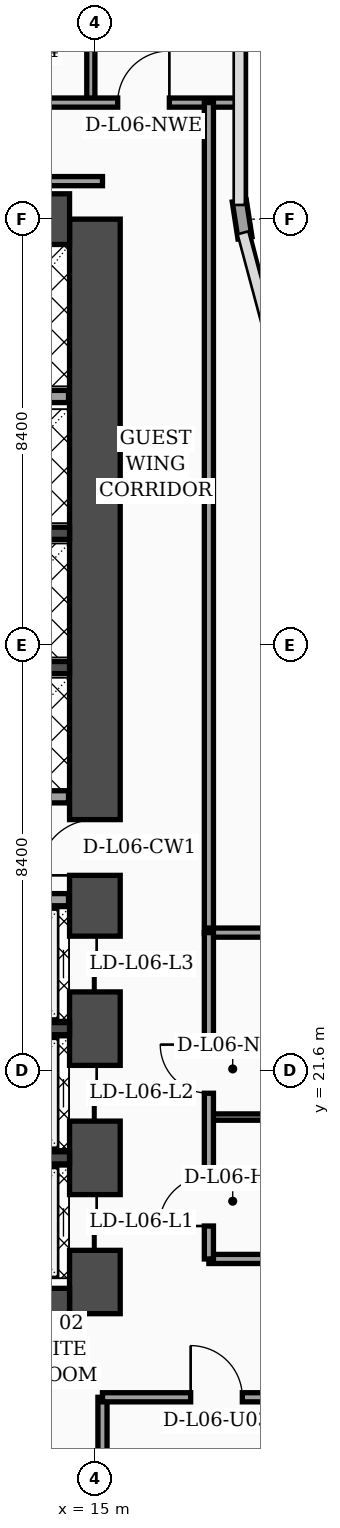
"""IFC4 building model, lengths in metres.
Left out: names, types, materials, properties, quantities, classifications, styles, units other than length and angle.
Written with IfcOpenShell. Run it as: python <this file> out.ifc"""

import sys

from ifc_helpers import new_model, si_unit, direction, frame, frame_2d, origin, place, context, subcontext, project, spatial, rectangle, extrude, element, fill, save


model = new_model("IFC4")
c1 = context("Model", 3, precision=1e-05, world=origin(), true_north=direction((0.0, 1.0)))
c2 = subcontext(c1, "Body", "Model", "MODEL_VIEW")
j1 = project(units=[si_unit("LENGTHUNIT", "METRE"), si_unit("PLANEANGLEUNIT", "RADIAN")], contexts=[c1])
p1 = place(None, origin())
s1 = spatial("IfcSite", under=j1, at=p1, CompositionType="ELEMENT")
p2 = place(p1, origin())
s2 = spatial("IfcBuilding", under=s1, at=p2, CompositionType="ELEMENT")
p3 = place(p2, frame((0.0, 0.0, 30.8)))
s3 = spatial("IfcBuildingStorey", under=s2, at=p3, CompositionType="ELEMENT", Elevation=30.8)
p4 = place(p3, frame((15.0, 16.8, 0.0), z_axis=(0.0, 0.0, 1.0), x_axis=(0.0, 1.0, 0.0)))
e1 = element("IfcWall", 1, at=p4, inside=s3, PredefinedType="SHEAR", context=c2, shape_type="SweptSolid", body=[
    extrude(rectangle(XDim=21.6, YDim=1.0, at=frame_2d((10.8, 0.0))), origin(), (0.0, 0.0, 1.0), 3.56),
])
p5 = place(p4, frame((8.65, 0.0, 0.0)))
e2 = element("IfcOpeningElement", 2, at=p5, cuts=e1, PredefinedType="OPENING", context=c2, shape_type="SweptSolid", body=[
    extrude(rectangle(XDim=1.1, YDim=2.2, at=frame_2d((0.55, 1.1))), frame((0.0, 0.51, 0.0), z_axis=(0.0, -1.0, 0.0), x_axis=(1.0, 0.0, 0.0)), (0.0, 0.0, 1.0), 1.02),
])
p6 = place(p4, frame((1.25, 0.0, 0.0)))
e3 = element("IfcOpeningElement", 3, at=p6, cuts=e1, PredefinedType="OPENING", context=c2, shape_type="SweptSolid", body=[
    extrude(rectangle(XDim=1.1, YDim=2.2, at=frame_2d((0.55, 1.1))), frame((0.0, 0.51, 0.0), z_axis=(0.0, -1.0, 0.0), x_axis=(1.0, 0.0, 0.0)), (0.0, 0.0, 1.0), 1.02),
])
p7 = place(p4, frame((3.8, 0.0, 0.0)))
e4 = element("IfcOpeningElement", 4, at=p7, cuts=e1, PredefinedType="OPENING", context=c2, shape_type="SweptSolid", body=[
    extrude(rectangle(XDim=1.1, YDim=2.2, at=frame_2d((0.55, 1.1))), frame((0.0, 0.51, 0.0), z_axis=(0.0, -1.0, 0.0), x_axis=(1.0, 0.0, 0.0)), (0.0, 0.0, 1.0), 1.02),
])
p8 = place(p4, frame((6.35, 0.0, 0.0)))
e5 = element("IfcOpeningElement", 5, at=p8, cuts=e1, PredefinedType="OPENING", context=c2, shape_type="SweptSolid", body=[
    extrude(rectangle(XDim=1.1, YDim=2.2, at=frame_2d((0.55, 1.1))), frame((0.0, 0.51, 0.0), z_axis=(0.0, -1.0, 0.0), x_axis=(1.0, 0.0, 0.0)), (0.0, 0.0, 1.0), 1.02),
])
for number, where, z_axis, x_axis in (
    (6, (4.7, 38.4, 0.0), (0.0, 0.0, 1.0), (1.0, 0.0, 0.0)),
    (7, (4.7, 16.8, 0.0), (0.0, 0.0, 1.0), (1.0, 0.0, 0.0)),
):
    element("IfcWall", number, at=place(p3, frame(where, z_axis=z_axis, x_axis=x_axis)), inside=s3, PredefinedType="SHEAR", context=c2, shape_type="SweptSolid", body=[
        extrude(rectangle(XDim=9.8, YDim=1.0, at=frame_2d((4.9, 0.0))), origin(), (0.0, 0.0, 1.0), 3.56),
    ])
for number, where, z_axis, x_axis in (
    (8, (12.18, 19.875, 0.0), (0.0, 0.0, 1.0), (1.0, 0.0, 0.0)),
    (9, (12.18, 22.425, 0.0), (0.0, 0.0, 1.0), (1.0, 0.0, 0.0)),
    (10, (12.18, 29.55, 0.0), (0.0, 0.0, 1.0), (1.0, 0.0, 0.0)),
    (11, (12.18, 32.2, 0.0), (0.0, 0.0, 1.0), (1.0, 0.0, 0.0)),
):
    element("IfcWall", number, at=place(p3, frame(where, z_axis=z_axis, x_axis=x_axis)), inside=s3, PredefinedType="SOLIDWALL", context=c2, shape_type="SweptSolid", body=[
        extrude(rectangle(XDim=2.32, YDim=0.24, at=frame_2d((1.16, 0.0))), origin(), (0.0, 0.0, 1.0), 3.56),
    ])
p9 = place(p3, frame((17.962, 38.03, 0.0), z_axis=(0.0, 0.0, 1.0), x_axis=(-0.15141125477, 0.988470855377, 0.0)))
e12 = element("IfcWall", 12, at=p9, inside=s3, PredefinedType="SOLIDWALL", context=c2, shape_type="SweptSolid", body=[
    extrude(rectangle(XDim=0.739, YDim=0.28, at=frame_2d((0.369, 0.0))), origin(), (0.0, 0.0, 1.0), 3.56),
])
p10 = place(p3, frame((12.15, 24.97, 0.0), z_axis=(0.0, 0.0, 1.0), x_axis=(1.0, 0.0, 0.0)))
e13 = element("IfcWall", 13, at=p10, inside=s3, PredefinedType="SOLIDWALL", context=c2, shape_type="SweptSolid", body=[
    extrude(rectangle(XDim=2.33, YDim=0.24, at=frame_2d((1.165, 0.0))), origin(), (0.0, 0.0, 1.0), 2.84),
])
p11 = place(p3, frame((12.25, 27.0, 0.0), z_axis=(0.0, 0.0, 1.0), x_axis=(1.0, 0.0, 0.0)))
e14 = element("IfcWall", 14, at=p11, inside=s3, PredefinedType="SOLIDWALL", context=c2, shape_type="SweptSolid", body=[
    extrude(rectangle(XDim=2.23, YDim=0.24, at=frame_2d((1.115, 0.0))), origin(), (0.0, 0.0, 1.0), 3.56),
])
p12 = place(p3, frame((9.66, 34.9, 0.0), z_axis=(0.0, 0.0, 1.0), x_axis=(1.0, 0.0, 0.0)))
e15 = element("IfcWall", 15, at=p12, inside=s3, PredefinedType="SOLIDWALL", context=c2, shape_type="SweptSolid", body=[
    extrude(rectangle(XDim=4.82, YDim=0.24, at=frame_2d((2.41, 0.0))), origin(), (0.0, 0.0, 1.0), 3.56),
])
p13 = place(p3, frame((15.15, 2.44, 0.0), z_axis=(0.0, 0.0, 1.0), x_axis=(0.0, 1.0, 0.0)))
e16 = element("IfcWall", 16, at=p13, inside=s3, PredefinedType="PARTITIONING", context=c2, shape_type="SweptSolid", body=[
    extrude(rectangle(XDim=12.71, YDim=0.18, at=frame_2d((6.355, 0.0))), origin(), (0.0, 0.0, 1.0), 3.04),
])
p14 = place(p3, frame((15.15, 15.15, 0.0), z_axis=(0.0, 0.0, 1.0), x_axis=(1.0, 0.0, 0.0)))
e17 = element("IfcWall", 17, at=p14, inside=s3, PredefinedType="PARTITIONING", context=c2, shape_type="SweptSolid", body=[
    extrude(rectangle(XDim=6.45, YDim=0.18, at=frame_2d((3.225, 0.0))), origin(), (0.0, 0.0, 1.0), 2.34),
])
p15 = place(p14, frame((1.74, 0.0, 0.0)))
e18 = element("IfcOpeningElement", 18, at=p15, cuts=e17, PredefinedType="OPENING", context=c2, shape_type="SweptSolid", body=[
    extrude(rectangle(XDim=1.02, YDim=2.2, at=frame_2d((0.51, 1.1))), frame((0.0, 0.1, 0.0), z_axis=(0.0, -1.0, 0.0), x_axis=(1.0, 0.0, 0.0)), (0.0, 0.0, 1.0), 0.2),
])
p16 = place(p3, frame((14.92, 40.7, 0.0), z_axis=(0.0, 0.0, 1.0), x_axis=(0.0, 1.0, 0.0)))
e19 = element("IfcWall", 19, at=p16, inside=s3, PredefinedType="PARTITIONING", context=c2, shape_type="SweptSolid", body=[
    extrude(rectangle(XDim=7.1, YDim=0.16, at=frame_2d((3.55, 0.0))), origin(), (0.0, 0.0, 1.0), 3.04),
])
p17 = place(p3, frame((0.08, 40.7, 0.0), z_axis=(0.0, 0.0, 1.0), x_axis=(1.0, 0.0, 0.0)))
e20 = element("IfcWall", 20, at=p17, inside=s3, PredefinedType="PARTITIONING", context=c2, shape_type="SweptSolid", body=[
    extrude(rectangle(XDim=17.77, YDim=0.18, at=frame_2d((8.885, 0.0))), origin(), (0.0, 0.0, 1.0), 2.84),
])
p18 = place(p17, frame((0.9, 0.0, 0.0)))
e21 = element("IfcOpeningElement", 21, at=p18, cuts=e20, PredefinedType="OPENING", context=c2, shape_type="SweptSolid", body=[
    extrude(rectangle(XDim=1.02, YDim=2.2, at=frame_2d((0.51, 1.1))), frame((0.0, 0.1, 0.0), z_axis=(0.0, -1.0, 0.0), x_axis=(1.0, 0.0, 0.0)), (0.0, 0.0, 1.0), 0.2),
])
p19 = place(p17, frame((7.38, 0.0, 0.0)))
e22 = element("IfcOpeningElement", 22, at=p19, cuts=e20, PredefinedType="OPENING", context=c2, shape_type="SweptSolid", body=[
    extrude(rectangle(XDim=1.02, YDim=2.2, at=frame_2d((0.51, 1.1))), frame((0.0, 0.1, 0.0), z_axis=(0.0, -1.0, 0.0), x_axis=(1.0, 0.0, 0.0)), (0.0, 0.0, 1.0), 0.2),
])
p20 = place(p17, frame((15.37, 0.0, 0.0)))
e23 = element("IfcOpeningElement", 23, at=p20, cuts=e20, PredefinedType="OPENING", context=c2, shape_type="SweptSolid", body=[
    extrude(rectangle(XDim=1.02, YDim=2.2, at=frame_2d((0.51, 1.1))), frame((0.0, 0.1, 0.0), z_axis=(0.0, -1.0, 0.0), x_axis=(1.0, 0.0, 0.0)), (0.0, 0.0, 1.0), 0.2),
])
p21 = place(p3, frame((17.25, 24.3, 0.0), z_axis=(0.0, 0.0, 1.0), x_axis=(0.0, 1.0, 0.0)))
e24 = element("IfcWall", 24, at=p21, inside=s3, PredefinedType="PARTITIONING", context=c2, shape_type="SweptSolid", body=[
    extrude(rectangle(XDim=16.4, YDim=0.18, at=frame_2d((8.2, 0.0))), origin(), (0.0, 0.0, 1.0), 2.84),
])
p22 = place(p3, frame((3.68, 39.15, 0.0), z_axis=(0.0, 0.0, 1.0), x_axis=(1.0, 0.0, 0.0)))
e25 = element("IfcWall", 25, at=p22, inside=s3, PredefinedType="PARTITIONING", context=c2, shape_type="SweptSolid", body=[
    extrude(rectangle(XDim=11.47, YDim=0.18, at=frame_2d((5.735, 0.0))), origin(), (0.0, 0.0, 1.0), 2.84),
])
p23 = place(p3, frame((17.25, 17.88, 0.0), z_axis=(0.0, 0.0, 1.0), x_axis=(1.0, 0.0, 0.0)))
e26 = element("IfcWall", 26, at=p23, inside=s3, PredefinedType="PARTITIONING", context=c2, shape_type="SweptSolid", body=[
    extrude(rectangle(XDim=4.3, YDim=0.18, at=frame_2d((2.15, 0.0))), origin(), (0.0, 0.0, 1.0), 3.09),
])
p24 = place(p3, frame((17.25, 20.68, 0.0), z_axis=(0.0, 0.0, 1.0), x_axis=(1.0, 0.0, 0.0)))
e27 = element("IfcWall", 27, at=p24, inside=s3, PredefinedType="PARTITIONING", context=c2, shape_type="SweptSolid", body=[
    extrude(rectangle(XDim=4.3, YDim=0.125, at=frame_2d((2.15, 0.0))), origin(), (0.0, 0.0, 1.0), 3.56),
])
p25 = place(p3, frame((17.25, 24.32, 0.0), z_axis=(0.0, 0.0, 1.0), x_axis=(1.0, 0.0, 0.0)))
e28 = element("IfcWall", 28, at=p25, inside=s3, PredefinedType="PARTITIONING", context=c2, shape_type="SweptSolid", body=[
    extrude(rectangle(XDim=4.35, YDim=0.18, at=frame_2d((2.175, 0.0))), origin(), (0.0, 0.0, 1.0), 3.56),
])
p26 = place(p3, frame((17.25, 17.88, 0.0), z_axis=(0.0, 0.0, 1.0), x_axis=(0.0, 1.0, 0.0)))
e29 = element("IfcWall", 29, at=p26, inside=s3, PredefinedType="PARTITIONING", context=c2, shape_type="SweptSolid", body=[
    extrude(rectangle(XDim=6.44, YDim=0.18, at=frame_2d((3.22, 0.0))), origin(), (0.0, 0.0, 1.0), 3.09),
])
p27 = place(p26, frame((0.65, 0.0, 0.0)))
e30 = element("IfcOpeningElement", 30, at=p27, cuts=e29, PredefinedType="OPENING", context=c2, shape_type="SweptSolid", body=[
    extrude(rectangle(XDim=0.98, YDim=2.15, at=frame_2d((0.49, 1.075))), frame((0.0, 0.1, 0.0), z_axis=(0.0, -1.0, 0.0), x_axis=(1.0, 0.0, 0.0)), (0.0, 0.0, 1.0), 0.2),
])
p28 = place(p26, frame((3.27, 0.0, 0.0)))
e31 = element("IfcOpeningElement", 31, at=p28, cuts=e29, PredefinedType="OPENING", context=c2, shape_type="SweptSolid", body=[
    extrude(rectangle(XDim=0.96, YDim=2.2, at=frame_2d((0.48, 1.1))), frame((0.0, 0.1, 0.0), z_axis=(0.0, -1.0, 0.0), x_axis=(1.0, 0.0, 0.0)), (0.0, 0.0, 1.0), 0.2),
])
p29 = place(p15, origin())
e32 = element("IfcDoor", 32, at=p29, inside=s3, OperationType="SINGLE_SWING_LEFT", PredefinedType="DOOR", context=c2, shape_type="SweptSolid", body=[
    extrude(rectangle(XDim=1.02, YDim=2.2, at=frame_2d((0.51, 1.1))), frame((0.0, 0.025, 0.0), z_axis=(0.0, -1.0, 0.0), x_axis=(1.0, 0.0, 0.0)), (0.0, 0.0, 1.0), 0.05),
])
fill(e18, e32)
p30 = place(p20, origin())
e33 = element("IfcDoor", 33, at=p30, inside=s3, OperationType="SINGLE_SWING_RIGHT", PredefinedType="DOOR", context=c2, shape_type="SweptSolid", body=[
    extrude(rectangle(XDim=1.02, YDim=2.2, at=frame_2d((0.51, 1.1))), frame((0.0, 0.025, 0.0), z_axis=(0.0, -1.0, 0.0), x_axis=(1.0, 0.0, 0.0)), (0.0, 0.0, 1.0), 0.05),
])
fill(e23, e33)
p31 = place(p27, origin())
e34 = element("IfcDoor", 34, at=p31, inside=s3, OperationType="SINGLE_SWING_LEFT", PredefinedType="DOOR", context=c2, shape_type="SweptSolid", body=[
    extrude(rectangle(XDim=0.98, YDim=2.15, at=frame_2d((0.49, 1.075))), frame((0.0, 0.025, 0.0), z_axis=(0.0, -1.0, 0.0), x_axis=(1.0, 0.0, 0.0)), (0.0, 0.0, 1.0), 0.05),
])
fill(e30, e34)
p32 = place(p28, origin())
e35 = element("IfcDoor", 35, at=p32, inside=s3, OperationType="SINGLE_SWING_RIGHT", PredefinedType="DOOR", context=c2, shape_type="SweptSolid", body=[
    extrude(rectangle(XDim=0.96, YDim=2.2, at=frame_2d((0.48, 1.1))), frame((0.0, 0.025, 0.0), z_axis=(0.0, -1.0, 0.0), x_axis=(1.0, 0.0, 0.0)), (0.0, 0.0, 1.0), 0.05),
])
fill(e31, e35)
p33 = place(p5, origin())
e36 = element("IfcDoor", 36, at=p33, inside=s3, OperationType="SINGLE_SWING_LEFT", PredefinedType="DOOR", context=c2, shape_type="SweptSolid", body=[
    extrude(rectangle(XDim=1.1, YDim=2.2, at=frame_2d((0.55, 1.1))), frame((0.0, 0.025, 0.0), z_axis=(0.0, -1.0, 0.0), x_axis=(1.0, 0.0, 0.0)), (0.0, 0.0, 1.0), 0.05),
])
fill(e2, e36)
p34 = place(p6, origin())
e37 = element("IfcDoor", 37, at=p34, inside=s3, OperationType="DOUBLE_DOOR_SLIDING", PredefinedType="DOOR", context=c2, shape_type="SweptSolid", body=[
    extrude(rectangle(XDim=1.1, YDim=2.2, at=frame_2d((0.55, 1.1))), frame((0.0, 0.025, 0.0), z_axis=(0.0, -1.0, 0.0), x_axis=(1.0, 0.0, 0.0)), (0.0, 0.0, 1.0), 0.05),
])
fill(e3, e37)
p35 = place(p7, origin())
e38 = element("IfcDoor", 38, at=p35, inside=s3, OperationType="DOUBLE_DOOR_SLIDING", PredefinedType="DOOR", context=c2, shape_type="SweptSolid", body=[
    extrude(rectangle(XDim=1.1, YDim=2.2, at=frame_2d((0.55, 1.1))), frame((0.0, 0.025, 0.0), z_axis=(0.0, -1.0, 0.0), x_axis=(1.0, 0.0, 0.0)), (0.0, 0.0, 1.0), 0.05),
])
fill(e4, e38)
p36 = place(p8, origin())
e39 = element("IfcDoor", 39, at=p36, inside=s3, OperationType="DOUBLE_DOOR_SLIDING", PredefinedType="DOOR", context=c2, shape_type="SweptSolid", body=[
    extrude(rectangle(XDim=1.1, YDim=2.2, at=frame_2d((0.55, 1.1))), frame((0.0, 0.025, 0.0), z_axis=(0.0, -1.0, 0.0), x_axis=(1.0, 0.0, 0.0)), (0.0, 0.0, 1.0), 0.05),
])
fill(e5, e39)
save(model, sys.argv[1])
